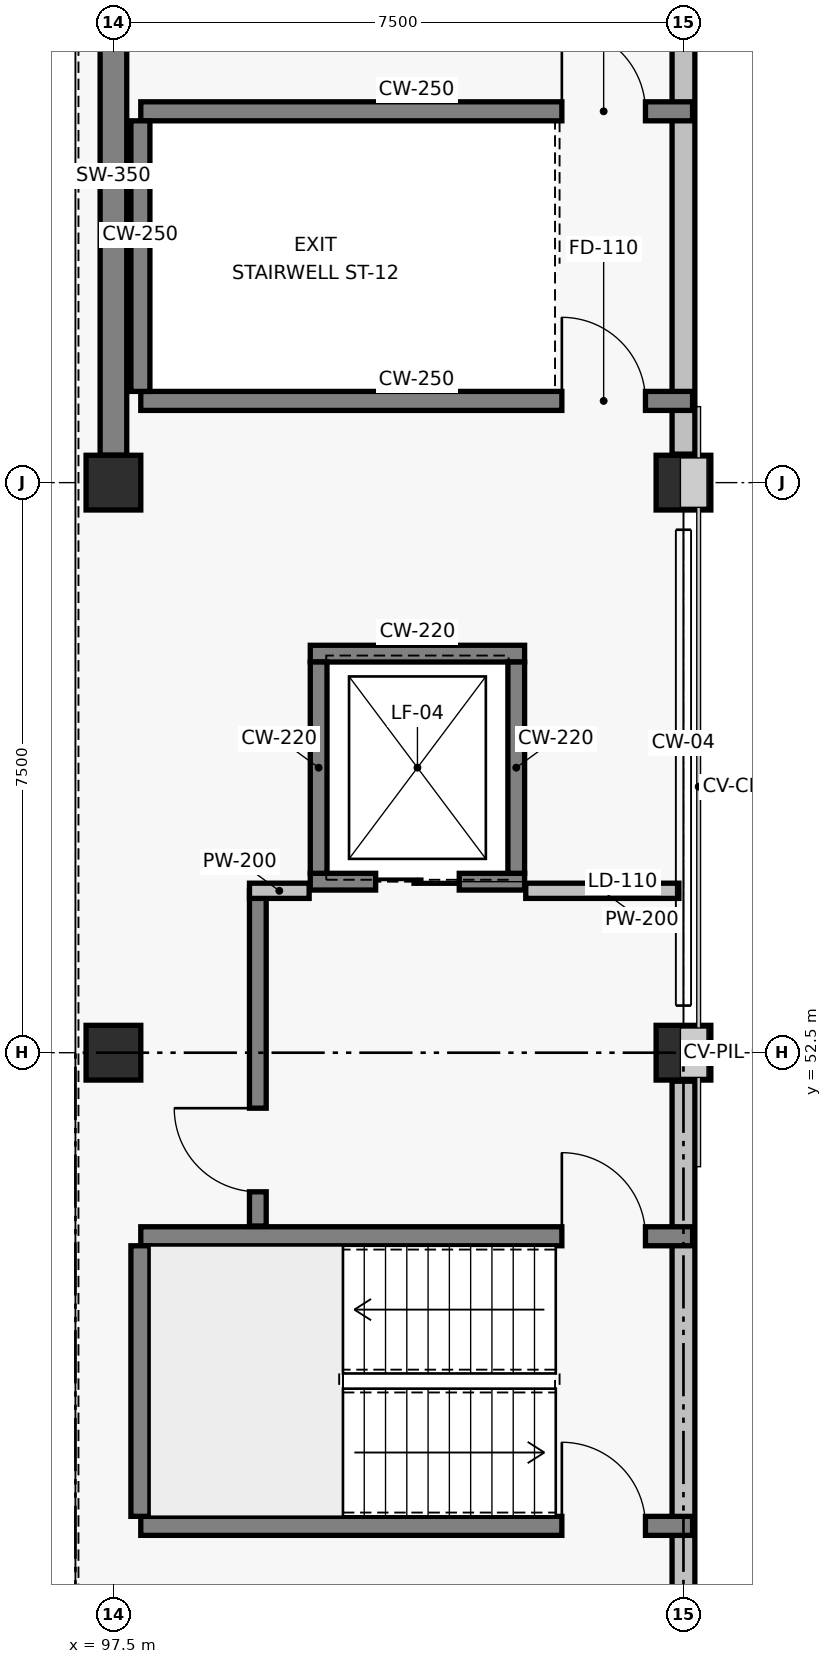
"""IFC4 building model, lengths in metres.
Left out: names, types, materials, properties, quantities, classifications, styles, units other than length and angle.
Written with IfcOpenShell. Run it as: python <this file> out.ifc"""

import sys

from ifc_helpers import new_model, si_unit, direction, frame, frame_2d, origin, origin_2d, place, context, subcontext, project, spatial, rectangle, extrude, element, fill, save


model = new_model("IFC4")
c1 = context("Model", 3, precision=1e-05, world=origin(), true_north=direction((0.0, 1.0)))
c2 = subcontext(c1, "Body", "Model", "MODEL_VIEW")
j1 = project(units=[si_unit("LENGTHUNIT", "METRE"), si_unit("PLANEANGLEUNIT", "RADIAN")], contexts=[c1])
p1 = place(None, origin())
s1 = spatial("IfcSite", under=j1, at=p1, CompositionType="ELEMENT")
p2 = place(p1, origin())
s2 = spatial("IfcBuilding", under=s1, at=p2, CompositionType="ELEMENT")
p3 = place(p2, frame((0.0, 0.0, 13.2)))
s3 = spatial("IfcBuildingStorey", under=s2, at=p3, CompositionType="ELEMENT", Elevation=13.2)
for number, where, z_axis, x_axis in (
    (1, (97.5, 52.5, 0.0), (0.0, 0.0, 1.0), (1.0, 0.0, 0.0)),
    (2, (97.5, 60.0, 0.0), (0.0, 0.0, 1.0), (1.0, 0.0, 0.0)),
    (3, (105.0, 52.5, 0.0), (0.0, 0.0, 1.0), (1.0, 0.0, 0.0)),
    (4, (105.0, 60.0, 0.0), (0.0, 0.0, 1.0), (1.0, 0.0, 0.0)),
):
    element("IfcColumn", number, at=place(p3, frame(where, z_axis=z_axis, x_axis=x_axis)), inside=s3, PredefinedType="COLUMN", context=c2, shape_type="SweptSolid", body=[
        extrude(rectangle(XDim=0.72, YDim=0.72, at=origin_2d()), origin(), (0.0, 0.0, 1.0), 3.9),
    ])
p4 = place(p3, frame((97.5, 60.36, 0.0), z_axis=(0.0, 0.0, 1.0), x_axis=(0.0, 1.0, 0.0)))
e5 = element("IfcWall", 5, at=p4, inside=s3, PredefinedType="SHEAR", context=c2, shape_type="SweptSolid", body=[
    extrude(rectangle(XDim=6.78, YDim=0.35, at=frame_2d((3.39, 0.0))), origin(), (0.0, 0.0, 1.0), 2.67),
])
p5 = place(p3, frame((105.0, 45.375, 0.0), z_axis=(0.0, 0.0, 1.0), x_axis=(0.0, 1.0, 0.0)))
e6 = element("IfcWall", 6, at=p5, inside=s3, PredefinedType="SOLIDWALL", context=c2, shape_type="SweptSolid", body=[
    extrude(rectangle(XDim=6.75, YDim=0.3, at=frame_2d((3.375, 0.0))), origin(), (0.0, 0.0, 1.0), 2.54),
])
p6 = place(p3, frame((105.0, 60.375, 0.0), z_axis=(0.0, 0.0, 1.0), x_axis=(0.0, 1.0, 0.0)))
e7 = element("IfcWall", 7, at=p6, inside=s3, PredefinedType="SOLIDWALL", context=c2, shape_type="SweptSolid", body=[
    extrude(rectangle(XDim=6.75, YDim=0.3, at=frame_2d((3.375, 0.0))), origin(), (0.0, 0.0, 1.0), 2.64),
])
p7 = place(p3, frame((97.86, 46.275, 0.0), z_axis=(0.0, 0.0, 1.0), x_axis=(1.0, 0.0, 0.0)))
e8 = element("IfcWall", 8, at=p7, inside=s3, PredefinedType="SOLIDWALL", context=c2, shape_type="SweptSolid", body=[
    extrude(rectangle(XDim=7.26, YDim=0.25, at=frame_2d((3.63, 0.0))), origin(), (0.0, 0.0, 1.0), 3.62),
])
p8 = place(p7, frame((5.54, 0.0, 0.0)))
e9 = element("IfcOpeningElement", 9, at=p8, cuts=e8, PredefinedType="OPENING", context=c2, shape_type="SweptSolid", body=[
    extrude(rectangle(XDim=1.1, YDim=2.15, at=frame_2d((0.55, 1.075))), frame((0.0, 0.135, 0.0), z_axis=(0.0, -1.0, 0.0), x_axis=(1.0, 0.0, 0.0)), (0.0, 0.0, 1.0), 0.27),
])
p9 = place(p3, frame((97.86, 50.085, 0.0), z_axis=(0.0, 0.0, 1.0), x_axis=(1.0, 0.0, 0.0)))
e10 = element("IfcWall", 10, at=p9, inside=s3, PredefinedType="SOLIDWALL", context=c2, shape_type="SweptSolid", body=[
    extrude(rectangle(XDim=7.26, YDim=0.25, at=frame_2d((3.63, 0.0))), origin(), (0.0, 0.0, 1.0), 3.62),
])
p10 = place(p9, frame((5.54, 0.0, 0.0)))
e11 = element("IfcOpeningElement", 11, at=p10, cuts=e10, PredefinedType="OPENING", context=c2, shape_type="SweptSolid", body=[
    extrude(rectangle(XDim=1.1, YDim=2.15, at=frame_2d((0.55, 1.075))), frame((0.0, 0.135, 0.0), z_axis=(0.0, -1.0, 0.0), x_axis=(1.0, 0.0, 0.0)), (0.0, 0.0, 1.0), 0.27),
])
p11 = place(p3, frame((97.855, 46.4, 0.0), z_axis=(0.0, 0.0, 1.0), x_axis=(0.0, 1.0, 0.0)))
e12 = element("IfcWall", 12, at=p11, inside=s3, PredefinedType="SOLIDWALL", context=c2, shape_type="SweptSolid", body=[
    extrude(rectangle(XDim=3.56, YDim=0.25, at=frame_2d((1.78, 0.0))), origin(), (0.0, 0.0, 1.0), 3.62),
])
p12 = place(p3, frame((97.86, 61.075, 0.0), z_axis=(0.0, 0.0, 1.0), x_axis=(1.0, 0.0, 0.0)))
e13 = element("IfcWall", 13, at=p12, inside=s3, PredefinedType="SOLIDWALL", context=c2, shape_type="SweptSolid", body=[
    extrude(rectangle(XDim=7.26, YDim=0.25, at=frame_2d((3.63, 0.0))), origin(), (0.0, 0.0, 1.0), 3.62),
])
p13 = place(p12, frame((5.54, 0.0, 0.0)))
e14 = element("IfcOpeningElement", 14, at=p13, cuts=e13, PredefinedType="OPENING", context=c2, shape_type="SweptSolid", body=[
    extrude(rectangle(XDim=1.1, YDim=2.15, at=frame_2d((0.55, 1.075))), frame((0.0, 0.135, 0.0), z_axis=(0.0, -1.0, 0.0), x_axis=(1.0, 0.0, 0.0)), (0.0, 0.0, 1.0), 0.27),
])
p14 = place(p3, frame((97.86, 64.885, 0.0), z_axis=(0.0, 0.0, 1.0), x_axis=(1.0, 0.0, 0.0)))
e15 = element("IfcWall", 15, at=p14, inside=s3, PredefinedType="SOLIDWALL", context=c2, shape_type="SweptSolid", body=[
    extrude(rectangle(XDim=7.26, YDim=0.25, at=frame_2d((3.63, 0.0))), origin(), (0.0, 0.0, 1.0), 3.62),
])
p15 = place(p14, frame((5.54, 0.0, 0.0)))
e16 = element("IfcOpeningElement", 16, at=p15, cuts=e15, PredefinedType="OPENING", context=c2, shape_type="SweptSolid", body=[
    extrude(rectangle(XDim=1.1, YDim=2.15, at=frame_2d((0.55, 1.075))), frame((0.0, 0.135, 0.0), z_axis=(0.0, -1.0, 0.0), x_axis=(1.0, 0.0, 0.0)), (0.0, 0.0, 1.0), 0.27),
])
p16 = place(p3, frame((97.855, 61.2, 0.0), z_axis=(0.0, 0.0, 1.0), x_axis=(0.0, 1.0, 0.0)))
e17 = element("IfcWall", 17, at=p16, inside=s3, PredefinedType="SOLIDWALL", context=c2, shape_type="SweptSolid", body=[
    extrude(rectangle(XDim=3.56, YDim=0.25, at=frame_2d((1.78, 0.0))), origin(), (0.0, 0.0, 1.0), 3.62),
])
p17 = place(p3, frame((100.09, 54.75, 0.0), z_axis=(0.0, 0.0, 1.0), x_axis=(1.0, 0.0, 0.0)))
e18 = element("IfcWall", 18, at=p17, inside=s3, PredefinedType="SOLIDWALL", context=c2, shape_type="SweptSolid", body=[
    extrude(rectangle(XDim=2.82, YDim=0.22, at=frame_2d((1.41, 0.0))), origin(), (0.0, 0.0, 1.0), 3.62),
])
p18 = place(p17, frame((0.86, 0.0, 0.0)))
e19 = element("IfcOpeningElement", 19, at=p18, cuts=e18, PredefinedType="OPENING", context=c2, shape_type="SweptSolid", body=[
    extrude(rectangle(XDim=1.1, YDim=2.15, at=frame_2d((0.55, 1.075))), frame((0.0, 0.12, 0.0), z_axis=(0.0, -1.0, 0.0), x_axis=(1.0, 0.0, 0.0)), (0.0, 0.0, 1.0), 0.24),
])
p19 = place(p3, frame((100.09, 57.75, 0.0), z_axis=(0.0, 0.0, 1.0), x_axis=(1.0, 0.0, 0.0)))
e20 = element("IfcWall", 20, at=p19, inside=s3, PredefinedType="SOLIDWALL", context=c2, shape_type="SweptSolid", body=[
    extrude(rectangle(XDim=2.82, YDim=0.22, at=frame_2d((1.41, 0.0))), origin(), (0.0, 0.0, 1.0), 3.62),
])
for number, where, z_axis, x_axis in (
    (21, (100.2, 54.86, 0.0), (0.0, 0.0, 1.0), (0.0, 1.0, 0.0)),
    (22, (102.8, 54.86, 0.0), (0.0, 0.0, 1.0), (0.0, 1.0, 0.0)),
):
    element("IfcWall", number, at=place(p3, frame(where, z_axis=z_axis, x_axis=x_axis)), inside=s3, PredefinedType="SOLIDWALL", context=c2, shape_type="SweptSolid", body=[
        extrude(rectangle(XDim=2.78, YDim=0.22, at=frame_2d((1.39, 0.0))), origin(), (0.0, 0.0, 1.0), 3.62),
    ])
p20 = place(p3, frame((99.4, 50.22, 0.0), z_axis=(0.0, 0.0, 1.0), x_axis=(0.0, 1.0, 0.0)))
e23 = element("IfcWall", 23, at=p20, inside=s3, PredefinedType="SOLIDWALL", context=c2, shape_type="SweptSolid", body=[
    extrude(rectangle(XDim=4.41, YDim=0.22, at=frame_2d((2.205, 0.0))), origin(), (0.0, 0.0, 1.0), 3.62),
])
p21 = place(p20, frame((0.45, 0.0, 0.0)))
e24 = element("IfcOpeningElement", 24, at=p21, cuts=e23, PredefinedType="OPENING", context=c2, shape_type="SweptSolid", body=[
    extrude(rectangle(XDim=1.1, YDim=2.15, at=frame_2d((0.55, 1.075))), frame((0.0, 0.12, 0.0), z_axis=(0.0, -1.0, 0.0), x_axis=(1.0, 0.0, 0.0)), (0.0, 0.0, 1.0), 0.24),
])
p22 = place(p3, frame((99.29, 54.63, 0.0), z_axis=(0.0, 0.0, 1.0), x_axis=(1.0, 0.0, 0.0)))
e25 = element("IfcWall", 25, at=p22, inside=s3, PredefinedType="PARTITIONING", context=c2, shape_type="SweptSolid", body=[
    extrude(rectangle(XDim=0.785, YDim=0.2, at=frame_2d((0.393, 0.0))), origin(), (0.0, 0.0, 1.0), 3.6),
])
p23 = place(p3, frame((102.925, 54.63, 0.0), z_axis=(0.0, 0.0, 1.0), x_axis=(1.0, 0.0, 0.0)))
e26 = element("IfcWall", 26, at=p23, inside=s3, PredefinedType="PARTITIONING", context=c2, shape_type="SweptSolid", body=[
    extrude(rectangle(XDim=2.015, YDim=0.2, at=frame_2d((1.007, 0.0))), origin(), (0.0, 0.0, 1.0), 2.85),
])
p24 = place(p8, origin())
e27 = element("IfcDoor", 27, at=p24, inside=s3, OperationType="SINGLE_SWING_LEFT", PredefinedType="DOOR", context=c2, shape_type="SweptSolid", body=[
    extrude(rectangle(XDim=1.1, YDim=2.15, at=frame_2d((0.55, 1.075))), frame((0.0, 0.025, 0.0), z_axis=(0.0, -1.0, 0.0), x_axis=(1.0, 0.0, 0.0)), (0.0, 0.0, 1.0), 0.05),
])
fill(e9, e27)
p25 = place(p10, frame((1.1, 0.0, 0.0), z_axis=(0.0, 0.0, 1.0), x_axis=(-1.0, 0.0, 0.0)))
e28 = element("IfcDoor", 28, at=p25, inside=s3, OperationType="SINGLE_SWING_RIGHT", PredefinedType="DOOR", context=c2, shape_type="SweptSolid", body=[
    extrude(rectangle(XDim=1.1, YDim=2.15, at=frame_2d((0.55, 1.075))), frame((0.0, 0.025, 0.0), z_axis=(0.0, -1.0, 0.0), x_axis=(1.0, 0.0, 0.0)), (0.0, 0.0, 1.0), 0.05),
])
fill(e11, e28)
p26 = place(p13, origin())
e29 = element("IfcDoor", 29, at=p26, inside=s3, OperationType="SINGLE_SWING_LEFT", PredefinedType="DOOR", context=c2, shape_type="SweptSolid", body=[
    extrude(rectangle(XDim=1.1, YDim=2.15, at=frame_2d((0.55, 1.075))), frame((0.0, 0.025, 0.0), z_axis=(0.0, -1.0, 0.0), x_axis=(1.0, 0.0, 0.0)), (0.0, 0.0, 1.0), 0.05),
])
fill(e14, e29)
p27 = place(p15, frame((1.1, 0.0, 0.0), z_axis=(0.0, 0.0, 1.0), x_axis=(-1.0, 0.0, 0.0)))
e30 = element("IfcDoor", 30, at=p27, inside=s3, OperationType="SINGLE_SWING_RIGHT", PredefinedType="DOOR", context=c2, shape_type="SweptSolid", body=[
    extrude(rectangle(XDim=1.1, YDim=2.15, at=frame_2d((0.55, 1.075))), frame((0.0, 0.025, 0.0), z_axis=(0.0, -1.0, 0.0), x_axis=(1.0, 0.0, 0.0)), (0.0, 0.0, 1.0), 0.05),
])
fill(e16, e30)
p28 = place(p18, origin())
e31 = element("IfcDoor", 31, at=p28, inside=s3, OperationType="SLIDING_TO_LEFT", PredefinedType="DOOR", context=c2, shape_type="SweptSolid", body=[
    extrude(rectangle(XDim=1.1, YDim=2.15, at=frame_2d((0.55, 1.075))), frame((0.0, 0.025, 0.0), z_axis=(0.0, -1.0, 0.0), x_axis=(1.0, 0.0, 0.0)), (0.0, 0.0, 1.0), 0.05),
])
fill(e19, e31)
p29 = place(p21, origin())
e32 = element("IfcDoor", 32, at=p29, inside=s3, OperationType="SINGLE_SWING_RIGHT", PredefinedType="DOOR", context=c2, shape_type="SweptSolid", body=[
    extrude(rectangle(XDim=1.1, YDim=2.15, at=frame_2d((0.55, 1.075))), frame((0.0, 0.025, 0.0), z_axis=(0.0, -1.0, 0.0), x_axis=(1.0, 0.0, 0.0)), (0.0, 0.0, 1.0), 0.05),
])
fill(e24, e32)
save(model, sys.argv[1])
